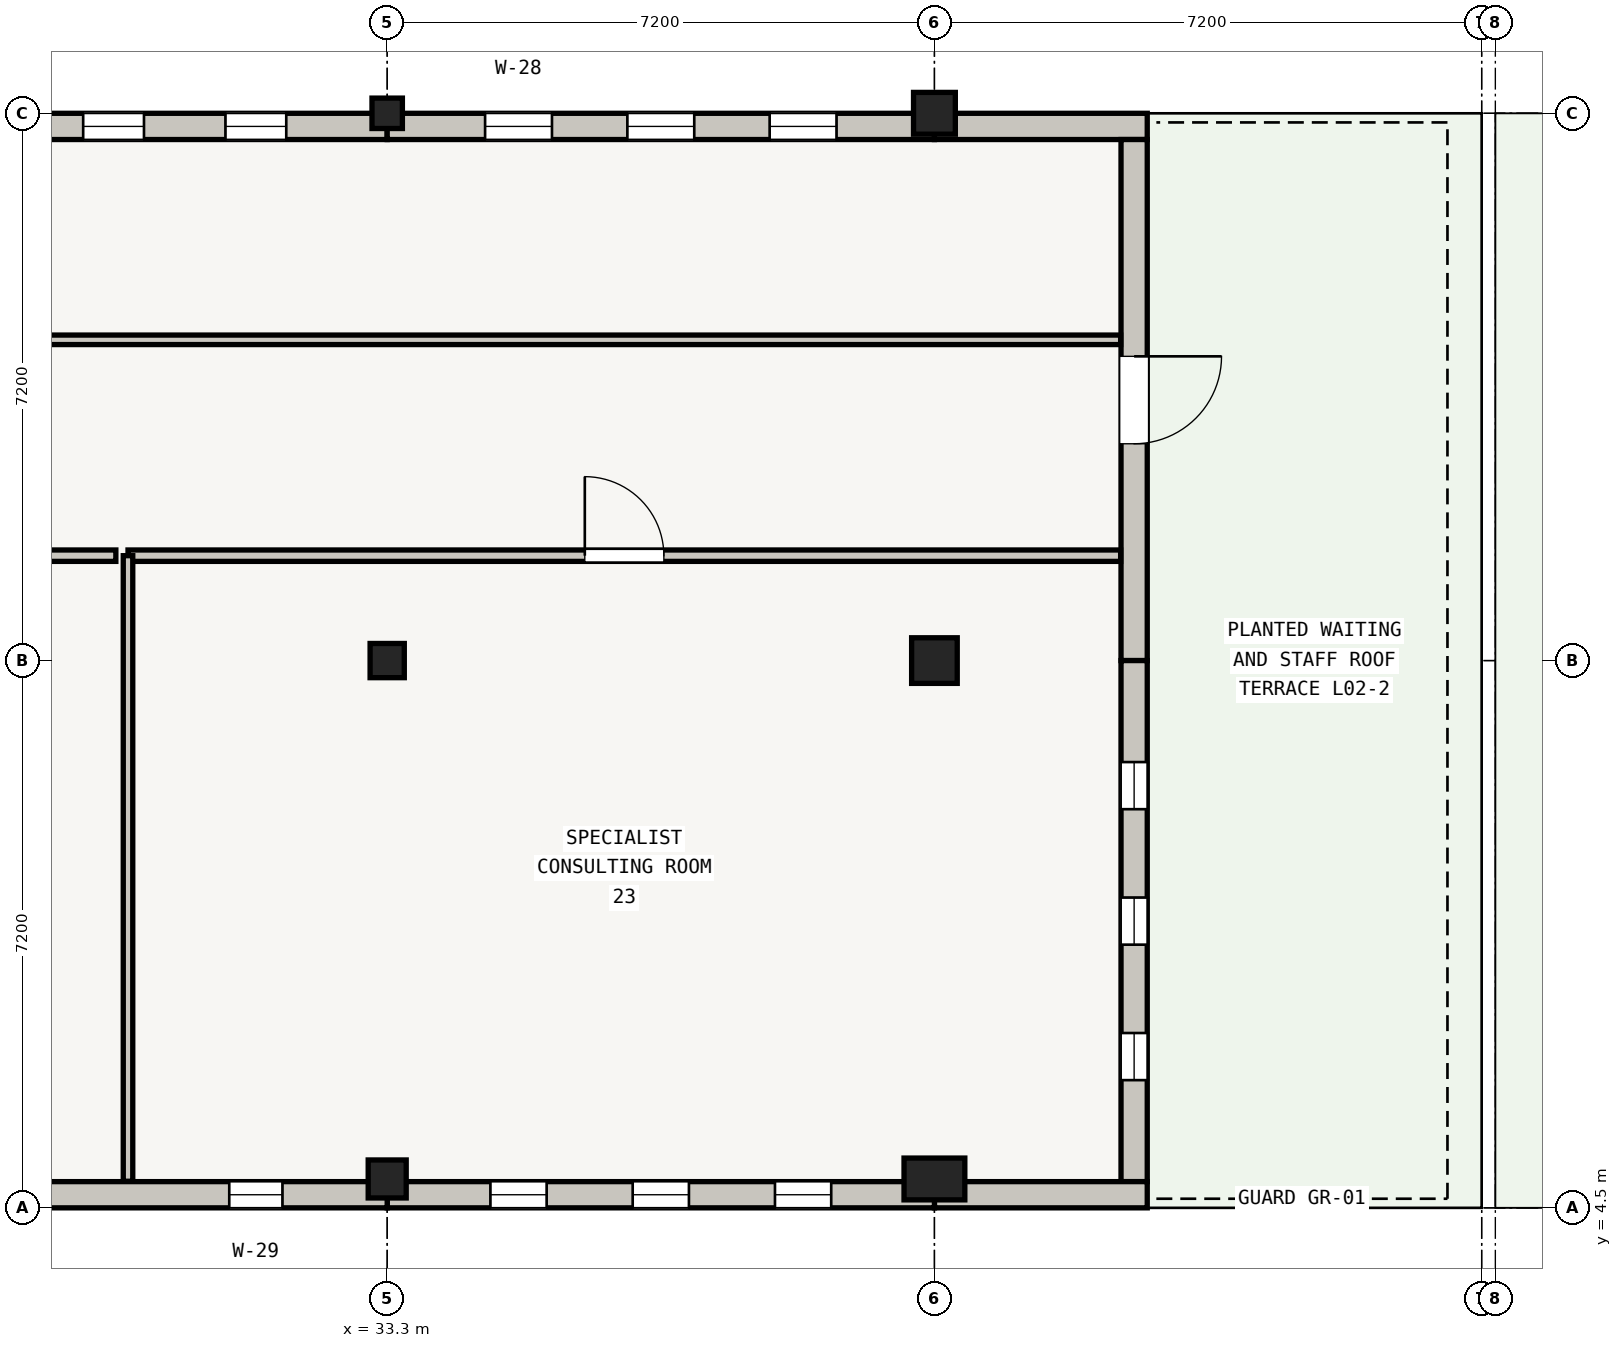
"""IFC4 building model, lengths in metres.
Left out: names, types, materials, properties, quantities, classifications, styles, units other than length and angle.
Written with IfcOpenShell. Run it as: python <this file> out.ifc"""

import sys

from ifc_helpers import new_model, si_unit, direction, frame, frame_2d, origin, origin_2d, place, context, subcontext, project, spatial, rectangle, extrude, element, fill, save


model = new_model("IFC4")
c1 = context("Model", 3, precision=1e-05, world=origin(), true_north=direction((0.0, 1.0)))
c2 = subcontext(c1, "Body", "Model", "MODEL_VIEW")
j1 = project(units=[si_unit("LENGTHUNIT", "METRE"), si_unit("PLANEANGLEUNIT", "RADIAN")], contexts=[c1])
p1 = place(None, origin())
s1 = spatial("IfcSite", under=j1, at=p1, CompositionType="ELEMENT")
p2 = place(p1, origin())
s2 = spatial("IfcBuilding", under=s1, at=p2, CompositionType="ELEMENT")
p3 = place(p2, frame((0.0, 0.0, 8.7)))
s3 = spatial("IfcBuildingStorey", under=s2, at=p3, CompositionType="ELEMENT", Elevation=8.7)
p4 = place(p3, frame((33.3, 4.88, 0.0), z_axis=(0.0, 0.0, 1.0), x_axis=(1.0, 0.0, 0.0)))
e1 = element("IfcColumn", 1, at=p4, inside=s3, PredefinedType="COLUMN", context=c2, shape_type="SweptSolid", body=[
    extrude(rectangle(XDim=0.5, YDim=0.5, at=origin_2d()), origin(), (0.0, 0.0, 1.0), 3.92),
])
p5 = place(p3, frame((33.3, 11.7, 0.0), z_axis=(0.0, 0.0, 1.0), x_axis=(1.0, 0.0, 0.0)))
e2 = element("IfcColumn", 2, at=p5, inside=s3, PredefinedType="COLUMN", context=c2, shape_type="SweptSolid", body=[
    extrude(rectangle(XDim=0.45, YDim=0.45, at=origin_2d()), origin(), (0.0, 0.0, 1.0), 3.92),
])
p6 = place(p3, frame((33.3, 18.9, 0.0), z_axis=(0.0, 0.0, 1.0), x_axis=(1.0, 0.0, 0.0)))
e3 = element("IfcColumn", 3, at=p6, inside=s3, PredefinedType="COLUMN", context=c2, shape_type="SweptSolid", body=[
    extrude(rectangle(XDim=0.4, YDim=0.4, at=origin_2d()), origin(), (0.0, 0.0, 1.0), 3.92),
])
p7 = place(p3, frame((40.5, 4.88, 0.0), z_axis=(0.0, 0.0, 1.0), x_axis=(1.0, 0.0, 0.0)))
e4 = element("IfcColumn", 4, at=p7, inside=s3, PredefinedType="COLUMN", context=c2, shape_type="SweptSolid", body=[
    extrude(rectangle(XDim=0.8, YDim=0.55, at=origin_2d()), origin(), (0.0, 0.0, 1.0), 3.92),
])
p8 = place(p3, frame((40.5, 11.7, 0.0), z_axis=(0.0, 0.0, 1.0), x_axis=(1.0, 0.0, 0.0)))
e5 = element("IfcColumn", 5, at=p8, inside=s3, PredefinedType="COLUMN", context=c2, shape_type="SweptSolid", body=[
    extrude(rectangle(XDim=0.6, YDim=0.6, at=origin_2d()), origin(), (0.0, 0.0, 1.0), 3.92),
])
p9 = place(p3, frame((40.5, 18.9, 0.0), z_axis=(0.0, 0.0, 1.0), x_axis=(1.0, 0.0, 0.0)))
e6 = element("IfcColumn", 6, at=p9, inside=s3, PredefinedType="COLUMN", context=c2, shape_type="SweptSolid", body=[
    extrude(rectangle(XDim=0.55, YDim=0.55, at=origin_2d()), origin(), (0.0, 0.0, 1.0), 3.92),
])
p10 = place(p3, frame((26.1, 18.728, 0.0), z_axis=(0.0, 0.0, 1.0), x_axis=(1.0, 0.0, 0.0)))
e7 = element("IfcWall", 7, at=p10, inside=s3, PredefinedType="SOLIDWALL", context=c2, shape_type="SweptSolid", body=[
    extrude(rectangle(XDim=7.2, YDim=0.345, at=frame_2d((3.6, 0.0))), origin(), (0.0, 0.0, 1.0), 3.105),
])
p11 = place(p10, frame((1.328, 0.0, 0.55)))
e8 = element("IfcOpeningElement", 8, at=p11, cuts=e7, PredefinedType="OPENING", context=c2, shape_type="SweptSolid", body=[
    extrude(rectangle(XDim=0.8, YDim=1.8, at=frame_2d((0.4, 0.9))), frame((0.0, 0.172, 0.0), z_axis=(0.0, -1.0, 0.0), x_axis=(1.0, 0.0, 0.0)), (0.0, 0.0, 1.0), 0.345),
])
p12 = place(p10, frame((3.2, 0.0, 0.55)))
e9 = element("IfcOpeningElement", 9, at=p12, cuts=e7, PredefinedType="OPENING", context=c2, shape_type="SweptSolid", body=[
    extrude(rectangle(XDim=0.8, YDim=1.8, at=frame_2d((0.4, 0.9))), frame((0.0, 0.172, 0.0), z_axis=(0.0, -1.0, 0.0), x_axis=(1.0, 0.0, 0.0)), (0.0, 0.0, 1.0), 0.345),
])
p13 = place(p10, frame((5.072, 0.0, 0.55)))
e10 = element("IfcOpeningElement", 10, at=p13, cuts=e7, PredefinedType="OPENING", context=c2, shape_type="SweptSolid", body=[
    extrude(rectangle(XDim=0.8, YDim=1.8, at=frame_2d((0.4, 0.9))), frame((0.0, 0.172, 0.0), z_axis=(0.0, -1.0, 0.0), x_axis=(1.0, 0.0, 0.0)), (0.0, 0.0, 1.0), 0.345),
])
p14 = place(p3, frame((33.3, 18.728, 0.0), z_axis=(0.0, 0.0, 1.0), x_axis=(1.0, 0.0, 0.0)))
e11 = element("IfcWall", 11, at=p14, inside=s3, PredefinedType="SOLIDWALL", context=c2, shape_type="SweptSolid", body=[
    extrude(rectangle(XDim=7.2, YDim=0.345, at=frame_2d((3.6, 0.0))), origin(), (0.0, 0.0, 1.0), 3.105),
])
p15 = place(p14, frame((1.288, 0.0, 0.55)))
e12 = element("IfcOpeningElement", 12, at=p15, cuts=e11, PredefinedType="OPENING", context=c2, shape_type="SweptSolid", body=[
    extrude(rectangle(XDim=0.88, YDim=1.8, at=frame_2d((0.44, 0.9))), frame((0.0, 0.172, 0.0), z_axis=(0.0, -1.0, 0.0), x_axis=(1.0, 0.0, 0.0)), (0.0, 0.0, 1.0), 0.345),
])
p16 = place(p14, frame((3.16, 0.0, 0.55)))
e13 = element("IfcOpeningElement", 13, at=p16, cuts=e11, PredefinedType="OPENING", context=c2, shape_type="SweptSolid", body=[
    extrude(rectangle(XDim=0.88, YDim=1.8, at=frame_2d((0.44, 0.9))), frame((0.0, 0.172, 0.0), z_axis=(0.0, -1.0, 0.0), x_axis=(1.0, 0.0, 0.0)), (0.0, 0.0, 1.0), 0.345),
])
p17 = place(p14, frame((5.032, 0.0, 0.55)))
e14 = element("IfcOpeningElement", 14, at=p17, cuts=e11, PredefinedType="OPENING", context=c2, shape_type="SweptSolid", body=[
    extrude(rectangle(XDim=0.88, YDim=1.8, at=frame_2d((0.44, 0.9))), frame((0.0, 0.172, 0.0), z_axis=(0.0, -1.0, 0.0), x_axis=(1.0, 0.0, 0.0)), (0.0, 0.0, 1.0), 0.345),
])
p18 = place(p3, frame((40.5, 18.728, 0.0), z_axis=(0.0, 0.0, 1.0), x_axis=(1.0, 0.0, 0.0)))
e15 = element("IfcWall", 15, at=p18, inside=s3, PredefinedType="SOLIDWALL", context=c2, shape_type="SweptSolid", body=[
    extrude(rectangle(XDim=2.8, YDim=0.345, at=frame_2d((1.4, 0.0))), origin(), (0.0, 0.0, 1.0), 3.105),
])
p19 = place(p3, frame((43.127, 18.555, 0.0), z_axis=(0.0, 0.0, 1.0), x_axis=(0.0, -1.0, 0.0)))
e16 = element("IfcWall", 16, at=p19, inside=s3, PredefinedType="SOLIDWALL", context=c2, shape_type="SweptSolid", body=[
    extrude(rectangle(XDim=6.855, YDim=0.345, at=frame_2d((3.427, 0.0))), origin(), (0.0, 0.0, 1.0), 3.92),
])
p20 = place(p19, frame((2.853, 0.0, 0.19)))
e17 = element("IfcOpeningElement", 17, at=p20, cuts=e16, PredefinedType="OPENING", context=c2, shape_type="SweptSolid", body=[
    extrude(rectangle(XDim=1.15, YDim=2.02, at=frame_2d((0.575, 1.01))), frame((0.0, 0.172, 0.0), z_axis=(0.0, -1.0, 0.0), x_axis=(1.0, 0.0, 0.0)), (0.0, 0.0, 1.0), 0.345),
])
p21 = place(p3, frame((43.127, 11.7, 0.0), z_axis=(0.0, 0.0, 1.0), x_axis=(0.0, -1.0, 0.0)))
e18 = element("IfcWall", 18, at=p21, inside=s3, PredefinedType="SOLIDWALL", context=c2, shape_type="SweptSolid", body=[
    extrude(rectangle(XDim=6.855, YDim=0.345, at=frame_2d((3.427, 0.0))), origin(), (0.0, 0.0, 1.0), 3.92),
])
p22 = place(p21, frame((1.335, 0.0, 0.55)))
e19 = element("IfcOpeningElement", 19, at=p22, cuts=e18, PredefinedType="OPENING", context=c2, shape_type="SweptSolid", body=[
    extrude(rectangle(XDim=0.62, YDim=2.35, at=frame_2d((0.31, 1.175))), frame((0.0, 0.172, 0.0), z_axis=(0.0, -1.0, 0.0), x_axis=(1.0, 0.0, 0.0)), (0.0, 0.0, 1.0), 0.345),
])
p23 = place(p21, frame((3.117, 0.0, 0.55)))
e20 = element("IfcOpeningElement", 20, at=p23, cuts=e18, PredefinedType="OPENING", context=c2, shape_type="SweptSolid", body=[
    extrude(rectangle(XDim=0.62, YDim=2.35, at=frame_2d((0.31, 1.175))), frame((0.0, 0.172, 0.0), z_axis=(0.0, -1.0, 0.0), x_axis=(1.0, 0.0, 0.0)), (0.0, 0.0, 1.0), 0.345),
])
p24 = place(p21, frame((4.9, 0.0, 0.55)))
e21 = element("IfcOpeningElement", 21, at=p24, cuts=e18, PredefinedType="OPENING", context=c2, shape_type="SweptSolid", body=[
    extrude(rectangle(XDim=0.62, YDim=2.35, at=frame_2d((0.31, 1.175))), frame((0.0, 0.172, 0.0), z_axis=(0.0, -1.0, 0.0), x_axis=(1.0, 0.0, 0.0)), (0.0, 0.0, 1.0), 0.345),
])
p25 = place(p3, frame((43.3, 4.673, 0.0), z_axis=(0.0, 0.0, 1.0), x_axis=(-1.0, 0.0, 0.0)))
e22 = element("IfcWall", 22, at=p25, inside=s3, PredefinedType="SOLIDWALL", context=c2, shape_type="SweptSolid", body=[
    extrude(rectangle(XDim=2.8, YDim=0.345, at=frame_2d((1.4, 0.0))), origin(), (0.0, 0.0, 1.0), 3.455),
])
p26 = place(p3, frame((40.5, 4.673, 0.0), z_axis=(0.0, 0.0, 1.0), x_axis=(-1.0, 0.0, 0.0)))
e23 = element("IfcWall", 23, at=p26, inside=s3, PredefinedType="SOLIDWALL", context=c2, shape_type="SweptSolid", body=[
    extrude(rectangle(XDim=7.2, YDim=0.345, at=frame_2d((3.6, 0.0))), origin(), (0.0, 0.0, 1.0), 3.305),
])
p27 = place(p26, frame((1.358, 0.0, 0.55)))
e24 = element("IfcOpeningElement", 24, at=p27, cuts=e23, PredefinedType="OPENING", context=c2, shape_type="SweptSolid", body=[
    extrude(rectangle(XDim=0.74, YDim=2.25, at=frame_2d((0.37, 1.125))), frame((0.0, 0.172, 0.0), z_axis=(0.0, -1.0, 0.0), x_axis=(1.0, 0.0, 0.0)), (0.0, 0.0, 1.0), 0.345),
])
p28 = place(p26, frame((3.23, 0.0, 0.55)))
e25 = element("IfcOpeningElement", 25, at=p28, cuts=e23, PredefinedType="OPENING", context=c2, shape_type="SweptSolid", body=[
    extrude(rectangle(XDim=0.74, YDim=2.25, at=frame_2d((0.37, 1.125))), frame((0.0, 0.172, 0.0), z_axis=(0.0, -1.0, 0.0), x_axis=(1.0, 0.0, 0.0)), (0.0, 0.0, 1.0), 0.345),
])
p29 = place(p26, frame((5.102, 0.0, 0.55)))
e26 = element("IfcOpeningElement", 26, at=p29, cuts=e23, PredefinedType="OPENING", context=c2, shape_type="SweptSolid", body=[
    extrude(rectangle(XDim=0.74, YDim=2.25, at=frame_2d((0.37, 1.125))), frame((0.0, 0.172, 0.0), z_axis=(0.0, -1.0, 0.0), x_axis=(1.0, 0.0, 0.0)), (0.0, 0.0, 1.0), 0.345),
])
p30 = place(p3, frame((33.3, 4.673, 0.0), z_axis=(0.0, 0.0, 1.0), x_axis=(-1.0, 0.0, 0.0)))
e27 = element("IfcWall", 27, at=p30, inside=s3, PredefinedType="SOLIDWALL", context=c2, shape_type="SweptSolid", body=[
    extrude(rectangle(XDim=7.2, YDim=0.345, at=frame_2d((3.6, 0.0))), origin(), (0.0, 0.0, 1.0), 2.955),
])
p31 = place(p30, frame((1.378, 0.0, 0.6)))
e28 = element("IfcOpeningElement", 28, at=p31, cuts=e27, PredefinedType="OPENING", context=c2, shape_type="SweptSolid", body=[
    extrude(rectangle(XDim=0.7, YDim=1.92, at=frame_2d((0.35, 0.96))), frame((0.0, 0.172, 0.0), z_axis=(0.0, -1.0, 0.0), x_axis=(1.0, 0.0, 0.0)), (0.0, 0.0, 1.0), 0.345),
])
p32 = place(p30, frame((5.122, 0.0, 0.6)))
e29 = element("IfcOpeningElement", 29, at=p32, cuts=e27, PredefinedType="OPENING", context=c2, shape_type="SweptSolid", body=[
    extrude(rectangle(XDim=0.7, YDim=1.92, at=frame_2d((0.35, 0.96))), frame((0.0, 0.172, 0.0), z_axis=(0.0, -1.0, 0.0), x_axis=(1.0, 0.0, 0.0)), (0.0, 0.0, 1.0), 0.345),
])
p33 = place(p3, frame((42.95, 15.92, 0.0), z_axis=(0.0, 0.0, 1.0), x_axis=(-1.0, 0.0, 0.0)))
e30 = element("IfcWall", 30, at=p33, inside=s3, PredefinedType="PARTITIONING", context=c2, shape_type="SweptSolid", body=[
    extrude(rectangle(XDim=26.28, YDim=0.125, at=frame_2d((13.14, 0.0))), origin(), (0.0, 0.0, 1.0), 2.94),
])
p34 = place(p3, frame((29.89, 13.08, 0.0), z_axis=(0.0, 0.0, 1.0), x_axis=(1.0, 0.0, 0.0)))
e31 = element("IfcWall", 31, at=p34, inside=s3, PredefinedType="PARTITIONING", context=c2, shape_type="SweptSolid", body=[
    extrude(rectangle(XDim=13.06, YDim=0.15, at=frame_2d((6.53, 0.0))), origin(), (0.0, 0.0, 1.0), 2.94),
])
p35 = place(p34, frame((6.01, 0.0, 0.0)))
e32 = element("IfcOpeningElement", 32, at=p35, cuts=e31, PredefinedType="OPENING", context=c2, shape_type="SweptSolid", body=[
    extrude(rectangle(XDim=1.04, YDim=2.05, at=frame_2d((0.52, 1.025))), frame((0.0, 0.075, 0.0), z_axis=(0.0, -1.0, 0.0), x_axis=(1.0, 0.0, 0.0)), (0.0, 0.0, 1.0), 0.15),
])
p36 = place(p3, frame((29.89, 4.85, 0.0), z_axis=(0.0, 0.0, 1.0), x_axis=(0.0, 1.0, 0.0)))
e33 = element("IfcWall", 33, at=p36, inside=s3, PredefinedType="PARTITIONING", context=c2, shape_type="SweptSolid", body=[
    extrude(rectangle(XDim=8.23, YDim=0.125, at=frame_2d((4.115, 0.0))), origin(), (0.0, 0.0, 1.0), 2.94),
])
p37 = place(p3, frame((16.67, 13.08, 0.0), z_axis=(0.0, 0.0, 1.0), x_axis=(1.0, 0.0, 0.0)))
e34 = element("IfcWall", 34, at=p37, inside=s3, PredefinedType="PARTITIONING", context=c2, shape_type="SweptSolid", body=[
    extrude(rectangle(XDim=13.06, YDim=0.15, at=frame_2d((6.53, 0.0))), origin(), (0.0, 0.0, 1.0), 2.94),
])
p38 = place(p37, frame((6.03, 0.0, 0.0)))
e35 = element("IfcOpeningElement", 35, at=p38, cuts=e34, PredefinedType="OPENING", context=c2, shape_type="SweptSolid", body=[
    extrude(rectangle(XDim=1.0, YDim=2.05, at=frame_2d((0.5, 1.025))), frame((0.0, 0.075, 0.0), z_axis=(0.0, -1.0, 0.0), x_axis=(1.0, 0.0, 0.0)), (0.0, 0.0, 1.0), 0.15),
])
p39 = place(p12, origin())
e36 = element("IfcWindow", 36, at=p39, inside=s3, PartitioningType="SINGLE_PANEL", PredefinedType="WINDOW", context=c2, shape_type="SweptSolid", body=[
    extrude(rectangle(XDim=0.8, YDim=1.8, at=frame_2d((0.4, 0.9))), frame((0.0, 0.03, 0.0), z_axis=(0.0, -1.0, 0.0), x_axis=(1.0, 0.0, 0.0)), (0.0, 0.0, 1.0), 0.06),
])
fill(e9, e36)
p40 = place(p13, origin())
e37 = element("IfcWindow", 37, at=p40, inside=s3, PartitioningType="SINGLE_PANEL", PredefinedType="WINDOW", context=c2, shape_type="SweptSolid", body=[
    extrude(rectangle(XDim=0.8, YDim=1.8, at=frame_2d((0.4, 0.9))), frame((0.0, 0.03, 0.0), z_axis=(0.0, -1.0, 0.0), x_axis=(1.0, 0.0, 0.0)), (0.0, 0.0, 1.0), 0.06),
])
fill(e10, e37)
p41 = place(p15, origin())
e38 = element("IfcWindow", 38, at=p41, inside=s3, PartitioningType="SINGLE_PANEL", PredefinedType="WINDOW", context=c2, shape_type="SweptSolid", body=[
    extrude(rectangle(XDim=0.88, YDim=1.8, at=frame_2d((0.44, 0.9))), frame((0.0, 0.03, 0.0), z_axis=(0.0, -1.0, 0.0), x_axis=(1.0, 0.0, 0.0)), (0.0, 0.0, 1.0), 0.06),
])
fill(e12, e38)
p42 = place(p16, origin())
e39 = element("IfcWindow", 39, at=p42, inside=s3, PartitioningType="SINGLE_PANEL", PredefinedType="WINDOW", context=c2, shape_type="SweptSolid", body=[
    extrude(rectangle(XDim=0.88, YDim=1.8, at=frame_2d((0.44, 0.9))), frame((0.0, 0.03, 0.0), z_axis=(0.0, -1.0, 0.0), x_axis=(1.0, 0.0, 0.0)), (0.0, 0.0, 1.0), 0.06),
])
fill(e13, e39)
p43 = place(p17, origin())
e40 = element("IfcWindow", 40, at=p43, inside=s3, PartitioningType="SINGLE_PANEL", PredefinedType="WINDOW", context=c2, shape_type="SweptSolid", body=[
    extrude(rectangle(XDim=0.88, YDim=1.8, at=frame_2d((0.44, 0.9))), frame((0.0, 0.03, 0.0), z_axis=(0.0, -1.0, 0.0), x_axis=(1.0, 0.0, 0.0)), (0.0, 0.0, 1.0), 0.06),
])
fill(e14, e40)
p44 = place(p20, origin())
e41 = element("IfcDoor", 41, at=p44, inside=s3, OperationType="SINGLE_SWING_LEFT", PredefinedType="DOOR", context=c2, shape_type="SweptSolid", body=[
    extrude(rectangle(XDim=1.15, YDim=2.02, at=frame_2d((0.575, 1.01))), frame((0.0, 0.025, 0.0), z_axis=(0.0, -1.0, 0.0), x_axis=(1.0, 0.0, 0.0)), (0.0, 0.0, 1.0), 0.05),
])
fill(e17, e41)
p45 = place(p22, origin())
e42 = element("IfcWindow", 42, at=p45, inside=s3, PartitioningType="SINGLE_PANEL", PredefinedType="WINDOW", context=c2, shape_type="SweptSolid", body=[
    extrude(rectangle(XDim=0.62, YDim=2.35, at=frame_2d((0.31, 1.175))), frame((0.0, 0.03, 0.0), z_axis=(0.0, -1.0, 0.0), x_axis=(1.0, 0.0, 0.0)), (0.0, 0.0, 1.0), 0.06),
])
fill(e19, e42)
p46 = place(p23, origin())
e43 = element("IfcWindow", 43, at=p46, inside=s3, PartitioningType="SINGLE_PANEL", PredefinedType="WINDOW", context=c2, shape_type="SweptSolid", body=[
    extrude(rectangle(XDim=0.62, YDim=2.35, at=frame_2d((0.31, 1.175))), frame((0.0, 0.03, 0.0), z_axis=(0.0, -1.0, 0.0), x_axis=(1.0, 0.0, 0.0)), (0.0, 0.0, 1.0), 0.06),
])
fill(e20, e43)
p47 = place(p24, origin())
e44 = element("IfcWindow", 44, at=p47, inside=s3, PartitioningType="SINGLE_PANEL", PredefinedType="WINDOW", context=c2, shape_type="SweptSolid", body=[
    extrude(rectangle(XDim=0.62, YDim=2.35, at=frame_2d((0.31, 1.175))), frame((0.0, 0.03, 0.0), z_axis=(0.0, -1.0, 0.0), x_axis=(1.0, 0.0, 0.0)), (0.0, 0.0, 1.0), 0.06),
])
fill(e21, e44)
p48 = place(p27, origin())
e45 = element("IfcWindow", 45, at=p48, inside=s3, PartitioningType="SINGLE_PANEL", PredefinedType="WINDOW", context=c2, shape_type="SweptSolid", body=[
    extrude(rectangle(XDim=0.74, YDim=2.25, at=frame_2d((0.37, 1.125))), frame((0.0, 0.03, 0.0), z_axis=(0.0, -1.0, 0.0), x_axis=(1.0, 0.0, 0.0)), (0.0, 0.0, 1.0), 0.06),
])
fill(e24, e45)
p49 = place(p28, origin())
e46 = element("IfcWindow", 46, at=p49, inside=s3, PartitioningType="SINGLE_PANEL", PredefinedType="WINDOW", context=c2, shape_type="SweptSolid", body=[
    extrude(rectangle(XDim=0.74, YDim=2.25, at=frame_2d((0.37, 1.125))), frame((0.0, 0.03, 0.0), z_axis=(0.0, -1.0, 0.0), x_axis=(1.0, 0.0, 0.0)), (0.0, 0.0, 1.0), 0.06),
])
fill(e25, e46)
p50 = place(p29, origin())
e47 = element("IfcWindow", 47, at=p50, inside=s3, PartitioningType="SINGLE_PANEL", PredefinedType="WINDOW", context=c2, shape_type="SweptSolid", body=[
    extrude(rectangle(XDim=0.74, YDim=2.25, at=frame_2d((0.37, 1.125))), frame((0.0, 0.03, 0.0), z_axis=(0.0, -1.0, 0.0), x_axis=(1.0, 0.0, 0.0)), (0.0, 0.0, 1.0), 0.06),
])
fill(e26, e47)
p51 = place(p31, origin())
e48 = element("IfcWindow", 48, at=p51, inside=s3, PartitioningType="SINGLE_PANEL", PredefinedType="WINDOW", context=c2, shape_type="SweptSolid", body=[
    extrude(rectangle(XDim=0.7, YDim=1.92, at=frame_2d((0.35, 0.96))), frame((0.0, 0.03, 0.0), z_axis=(0.0, -1.0, 0.0), x_axis=(1.0, 0.0, 0.0)), (0.0, 0.0, 1.0), 0.06),
])
fill(e28, e48)
p52 = place(p35, origin())
e49 = element("IfcDoor", 49, at=p52, inside=s3, OperationType="SINGLE_SWING_LEFT", PredefinedType="DOOR", context=c2, shape_type="SweptSolid", body=[
    extrude(rectangle(XDim=1.04, YDim=2.05, at=frame_2d((0.52, 1.025))), frame((0.0, 0.025, 0.0), z_axis=(0.0, -1.0, 0.0), x_axis=(1.0, 0.0, 0.0)), (0.0, 0.0, 1.0), 0.05),
])
fill(e32, e49)
save(model, sys.argv[1])
